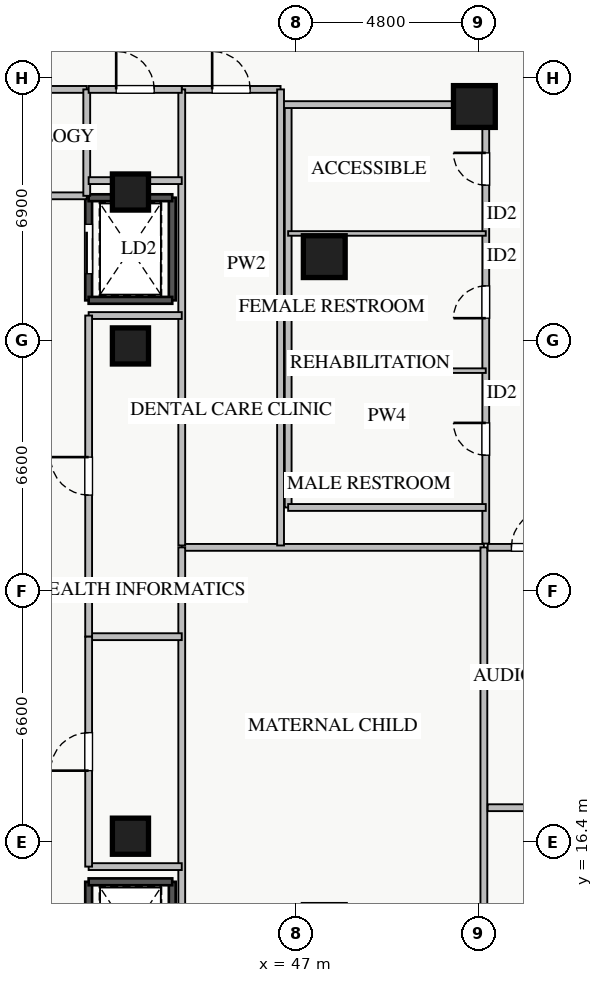
"""IFC4 building model, lengths in metres.
Left out: names, types, materials, properties, quantities, classifications, styles, units other than length and angle.
Written with IfcOpenShell. Run it as: python <this file> out.ifc"""

import sys

from ifc_helpers import new_model, si_unit, direction, frame, frame_2d, origin, origin_2d, place, context, subcontext, project, spatial, rectangle, extrude, source, transform, mapped, element, fill, save


model = new_model("IFC4")
c1 = context("Model", 3, precision=1e-05, world=origin(), true_north=direction((0.0, 1.0)))
c2 = subcontext(c1, "Body", "Model", "MODEL_VIEW")
j1 = project(units=[si_unit("LENGTHUNIT", "METRE"), si_unit("PLANEANGLEUNIT", "RADIAN")], contexts=[c1])
p1 = place(None, origin())
s1 = spatial("IfcSite", under=j1, at=p1, CompositionType="ELEMENT")
p2 = place(p1, origin())
s2 = spatial("IfcBuilding", under=s1, at=p2, CompositionType="ELEMENT")
p3 = place(p2, frame((0.0, 0.0, 18.2)))
s3 = spatial("IfcBuildingStorey", under=s2, at=p3, CompositionType="ELEMENT", Elevation=18.2)
p4 = place(p3, frame((41.55, 30.65, 0.0), z_axis=(0.0, 0.0, 1.0), x_axis=(0.0, 1.0, 0.0)))
e1 = element("IfcWall", 1, at=p4, inside=s3, PredefinedType="SHEAR", context=c2, shape_type="SweptSolid", body=[
    extrude(rectangle(XDim=2.7, YDim=0.18, at=frame_2d((1.35, 0.0))), origin(), (0.0, 0.0, 1.0), 4.62),
])
p5 = place(p4, frame((0.7, 0.0, 0.0)))
e2 = element("IfcOpeningElement", 2, at=p5, cuts=e1, PredefinedType="OPENING", context=c2, shape_type="SweptSolid", body=[
    extrude(rectangle(XDim=1.3, YDim=2.05, at=frame_2d((0.65, 1.025))), frame((0.0, 0.1, 0.0), z_axis=(0.0, -1.0, 0.0), x_axis=(1.0, 0.0, 0.0)), (0.0, 0.0, 1.0), 0.2),
])
p6 = place(p3, frame((43.75, 30.65, 0.0), z_axis=(0.0, 0.0, 1.0), x_axis=(0.0, 1.0, 0.0)))
e3 = element("IfcWall", 3, at=p6, inside=s3, PredefinedType="SHEAR", context=c2, shape_type="SweptSolid", body=[
    extrude(rectangle(XDim=2.7, YDim=0.18, at=frame_2d((1.35, 0.0))), origin(), (0.0, 0.0, 1.0), 4.62),
])
for number, where, z_axis, x_axis in (
    (4, (41.55, 30.65, 0.0), (0.0, 0.0, 1.0), (1.0, 0.0, 0.0)),
    (5, (41.55, 33.35, 0.0), (0.0, 0.0, 1.0), (1.0, 0.0, 0.0)),
):
    element("IfcWall", number, at=place(p3, frame(where, z_axis=z_axis, x_axis=x_axis)), inside=s3, PredefinedType="SHEAR", context=c2, shape_type="SweptSolid", body=[
        extrude(rectangle(XDim=2.2, YDim=0.18, at=frame_2d((1.1, 0.0))), origin(), (0.0, 0.0, 1.0), 4.62),
    ])
p7 = place(p3, frame((41.55, 12.65, 0.0), z_axis=(0.0, 0.0, 1.0), x_axis=(0.0, 1.0, 0.0)))
e6 = element("IfcWall", 6, at=p7, inside=s3, PredefinedType="SHEAR", context=c2, shape_type="SweptSolid", body=[
    extrude(rectangle(XDim=2.7, YDim=0.18, at=frame_2d((1.35, 0.0))), origin(), (0.0, 0.0, 1.0), 4.62),
])
p8 = place(p7, frame((0.7, 0.0, 0.0)))
e7 = element("IfcOpeningElement", 7, at=p8, cuts=e6, PredefinedType="OPENING", context=c2, shape_type="SweptSolid", body=[
    extrude(rectangle(XDim=1.3, YDim=2.05, at=frame_2d((0.65, 1.025))), frame((0.0, 0.1, 0.0), z_axis=(0.0, -1.0, 0.0), x_axis=(1.0, 0.0, 0.0)), (0.0, 0.0, 1.0), 0.2),
])
p9 = place(p3, frame((43.75, 12.65, 0.0), z_axis=(0.0, 0.0, 1.0), x_axis=(0.0, 1.0, 0.0)))
e8 = element("IfcWall", 8, at=p9, inside=s3, PredefinedType="SHEAR", context=c2, shape_type="SweptSolid", body=[
    extrude(rectangle(XDim=2.7, YDim=0.18, at=frame_2d((1.35, 0.0))), origin(), (0.0, 0.0, 1.0), 4.62),
])
p10 = place(p3, frame((41.55, 15.35, 0.0), z_axis=(0.0, 0.0, 1.0), x_axis=(1.0, 0.0, 0.0)))
e9 = element("IfcWall", 9, at=p10, inside=s3, PredefinedType="SHEAR", context=c2, shape_type="SweptSolid", body=[
    extrude(rectangle(XDim=2.2, YDim=0.18, at=frame_2d((1.1, 0.0))), origin(), (0.0, 0.0, 1.0), 4.62),
])
m1 = source(origin(), c2, "Body", "SweptSolid", [
    extrude(rectangle(XDim=1.1, YDim=1.1, at=origin_2d()), origin(), (0.0, 0.0, 1.0), 4.8),
])
for number, where, z_axis, x_axis in (
    (10, (51.7, 35.75, 0.0), (0.0, 0.0, 1.0), (1.0, 0.0, 0.0)),
    (11, (47.75, 31.8, 0.0), (0.0, 0.0, 1.0), (1.0, 0.0, 0.0)),
):
    element("IfcColumn", number, at=place(p3, frame(where, z_axis=z_axis, x_axis=x_axis)), inside=s3, PredefinedType="COLUMN", context=c2, shape_type="MappedRepresentation", body=[
        mapped(m1, transform((0.0, 0.0, 0.0), x_axis=(1.0, 0.0, 0.0), y_axis=(0.0, 1.0, 0.0), z_axis=(0.0, 0.0, 1.0), scale=1.0)),
    ])
m2 = source(origin(), c2, "Body", "SweptSolid", [
    extrude(rectangle(XDim=0.95, YDim=0.95, at=origin_2d()), origin(), (0.0, 0.0, 1.0), 4.8),
])
for number, where, z_axis, x_axis in (
    (12, (42.65, 16.55, 0.0), (0.0, 0.0, 1.0), (1.0, 0.0, 0.0)),
    (13, (42.65, 29.45, 0.0), (0.0, 0.0, 1.0), (1.0, 0.0, 0.0)),
    (14, (42.65, 33.5, 0.0), (0.0, 0.0, 1.0), (1.0, 0.0, 0.0)),
):
    element("IfcColumn", number, at=place(p3, frame(where, z_axis=z_axis, x_axis=x_axis)), inside=s3, PredefinedType="COLUMN", context=c2, shape_type="MappedRepresentation", body=[
        mapped(m2, transform((0.0, 0.0, 0.0), x_axis=(1.0, 0.0, 0.0), y_axis=(0.0, 1.0, 0.0), z_axis=(0.0, 0.0, 1.0), scale=1.0)),
    ])
p11 = place(p3, frame((52.0, 24.25, 0.0), z_axis=(0.0, 0.0, 1.0), x_axis=(0.0, 1.0, 0.0)))
e15 = element("IfcWall", 15, at=p11, inside=s3, PredefinedType="PARTITIONING", context=c2, shape_type="SweptSolid", body=[
    extrude(rectangle(XDim=11.55, YDim=0.18, at=frame_2d((5.775, 0.0))), origin(), (0.0, 0.0, 1.0), 4.62),
])
p12 = place(p11, frame((2.325, 0.0, 0.0)))
e16 = element("IfcOpeningElement", 16, at=p12, cuts=e15, PredefinedType="OPENING", context=c2, shape_type="SweptSolid", body=[
    extrude(rectangle(XDim=0.85, YDim=2.05, at=frame_2d((0.425, 1.025))), frame((0.0, 0.1, 0.0), z_axis=(0.0, -1.0, 0.0), x_axis=(1.0, 0.0, 0.0)), (0.0, 0.0, 1.0), 0.2),
])
p13 = place(p11, frame((5.93, 0.0, 0.0)))
e17 = element("IfcOpeningElement", 17, at=p13, cuts=e15, PredefinedType="OPENING", context=c2, shape_type="SweptSolid", body=[
    extrude(rectangle(XDim=0.85, YDim=2.05, at=frame_2d((0.425, 1.025))), frame((0.0, 0.1, 0.0), z_axis=(0.0, -1.0, 0.0), x_axis=(1.0, 0.0, 0.0)), (0.0, 0.0, 1.0), 0.2),
])
p14 = place(p11, frame((9.43, 0.0, 0.0)))
e18 = element("IfcOpeningElement", 18, at=p14, cuts=e15, PredefinedType="OPENING", context=c2, shape_type="SweptSolid", body=[
    extrude(rectangle(XDim=0.85, YDim=2.05, at=frame_2d((0.425, 1.025))), frame((0.0, 0.1, 0.0), z_axis=(0.0, -1.0, 0.0), x_axis=(1.0, 0.0, 0.0)), (0.0, 0.0, 1.0), 0.2),
])
p15 = place(p3, frame((46.8, 25.2, 0.0), z_axis=(0.0, 0.0, 1.0), x_axis=(0.0, 1.0, 0.0)))
e19 = element("IfcWall", 19, at=p15, inside=s3, PredefinedType="PARTITIONING", context=c2, shape_type="SweptSolid", body=[
    extrude(rectangle(XDim=10.6, YDim=0.18, at=frame_2d((5.3, 0.0))), origin(), (0.0, 0.0, 1.0), 4.62),
])
p16 = place(p3, frame((46.8, 25.2, 0.0), z_axis=(0.0, 0.0, 1.0), x_axis=(1.0, 0.0, 0.0)))
e20 = element("IfcWall", 20, at=p16, inside=s3, PredefinedType="PARTITIONING", context=c2, shape_type="SweptSolid", body=[
    extrude(rectangle(XDim=5.2, YDim=0.18, at=frame_2d((2.6, 0.0))), origin(), (0.0, 0.0, 1.0), 4.62),
])
p17 = place(p3, frame((46.65, 35.8, 0.0), z_axis=(0.0, 0.0, 1.0), x_axis=(1.0, 0.0, 0.0)))
e21 = element("IfcWall", 21, at=p17, inside=s3, PredefinedType="PARTITIONING", context=c2, shape_type="SweptSolid", body=[
    extrude(rectangle(XDim=5.35, YDim=0.18, at=frame_2d((2.675, 0.0))), origin(), (0.0, 0.0, 1.0), 4.62),
])
for number, where, z_axis, x_axis in (
    (22, (46.8, 28.8, 0.0), (0.0, 0.0, 1.0), (1.0, 0.0, 0.0)),
    (23, (46.8, 32.41, 0.0), (0.0, 0.0, 1.0), (1.0, 0.0, 0.0)),
):
    element("IfcWall", number, at=place(p3, frame(where, z_axis=z_axis, x_axis=x_axis)), inside=s3, PredefinedType="PLUMBINGWALL", context=c2, shape_type="SweptSolid", body=[
        extrude(rectangle(XDim=5.2, YDim=0.12, at=frame_2d((2.6, 0.0))), origin(), (0.0, 0.0, 1.0), 4.62),
    ])
p18 = place(p3, frame((32.3, 33.4, 0.0), z_axis=(0.0, 0.0, 1.0), x_axis=(1.0, 0.0, 0.0)))
e24 = element("IfcWall", 24, at=p18, inside=s3, PredefinedType="PARTITIONING", context=c2, shape_type="SweptSolid", body=[
    extrude(rectangle(XDim=9.2, YDim=0.18, at=frame_2d((4.6, 0.0))), origin(), (0.0, 0.0, 1.0), 3.915),
])
p19 = place(p3, frame((32.3, 36.2, 0.0), z_axis=(0.0, 0.0, 1.0), x_axis=(1.0, 0.0, 0.0)))
e25 = element("IfcWall", 25, at=p19, inside=s3, PredefinedType="PARTITIONING", context=c2, shape_type="SweptSolid", body=[
    extrude(rectangle(XDim=9.2, YDim=0.18, at=frame_2d((4.6, 0.0))), origin(), (0.0, 0.0, 1.0), 4.62),
])
p20 = place(p19, frame((2.85, 0.0, 0.0)))
e26 = element("IfcOpeningElement", 26, at=p20, cuts=e25, PredefinedType="OPENING", context=c2, shape_type="SweptSolid", body=[
    extrude(rectangle(XDim=1.0, YDim=2.05, at=frame_2d((0.5, 1.025))), frame((0.0, 0.1, 0.0), z_axis=(0.0, -1.0, 0.0), x_axis=(1.0, 0.0, 0.0)), (0.0, 0.0, 1.0), 0.2),
])
p21 = place(p3, frame((41.5, 33.4, 0.0), z_axis=(0.0, 0.0, 1.0), x_axis=(0.0, 1.0, 0.0)))
e27 = element("IfcWall", 27, at=p21, inside=s3, PredefinedType="PARTITIONING", context=c2, shape_type="SweptSolid", body=[
    extrude(rectangle(XDim=2.8, YDim=0.18, at=frame_2d((1.4, 0.0))), origin(), (0.0, 0.0, 1.0), 4.62),
])
p22 = place(p3, frame((44.0, 24.15, 0.0), z_axis=(0.0, 0.0, 1.0), x_axis=(1.0, 0.0, 0.0)))
e28 = element("IfcWall", 28, at=p22, inside=s3, PredefinedType="PARTITIONING", context=c2, shape_type="SweptSolid", body=[
    extrude(rectangle(XDim=7.95, YDim=0.18, at=frame_2d((3.975, 0.0))), origin(), (0.0, 0.0, 1.0), 4.62),
])
for number, where, z_axis, x_axis in (
    (29, (44.0, 9.8, 0.0), (0.0, 0.0, 1.0), (0.0, 1.0, 0.0)),
    (30, (51.95, 9.8, 0.0), (0.0, 0.0, 1.0), (0.0, 1.0, 0.0)),
):
    element("IfcWall", number, at=place(p3, frame(where, z_axis=z_axis, x_axis=x_axis)), inside=s3, PredefinedType="PARTITIONING", context=c2, shape_type="SweptSolid", body=[
        extrude(rectangle(XDim=14.35, YDim=0.18, at=frame_2d((7.175, 0.0))), origin(), (0.0, 0.0, 1.0), 4.62),
    ])
p23 = place(p3, frame((44.0, 36.2, 0.0), z_axis=(0.0, 0.0, 1.0), x_axis=(1.0, 0.0, 0.0)))
e31 = element("IfcWall", 31, at=p23, inside=s3, PredefinedType="PARTITIONING", context=c2, shape_type="SweptSolid", body=[
    extrude(rectangle(XDim=2.6, YDim=0.18, at=frame_2d((1.3, 0.0))), origin(), (0.0, 0.0, 1.0), 4.62),
])
p24 = place(p23, frame((0.8, 0.0, 0.0)))
e32 = element("IfcOpeningElement", 32, at=p24, cuts=e31, PredefinedType="OPENING", context=c2, shape_type="SweptSolid", body=[
    extrude(rectangle(XDim=1.0, YDim=2.05, at=frame_2d((0.5, 1.025))), frame((0.0, 0.1, 0.0), z_axis=(0.0, -1.0, 0.0), x_axis=(1.0, 0.0, 0.0)), (0.0, 0.0, 1.0), 0.2),
])
for number, where, z_axis, x_axis in (
    (33, (44.0, 24.2, 0.0), (0.0, 0.0, 1.0), (0.0, 1.0, 0.0)),
    (34, (46.6, 24.2, 0.0), (0.0, 0.0, 1.0), (0.0, 1.0, 0.0)),
):
    element("IfcWall", number, at=place(p3, frame(where, z_axis=z_axis, x_axis=x_axis)), inside=s3, PredefinedType="PARTITIONING", context=c2, shape_type="SweptSolid", body=[
        extrude(rectangle(XDim=12.0, YDim=0.18, at=frame_2d((6.0, 0.0))), origin(), (0.0, 0.0, 1.0), 4.62),
    ])
for number, where, z_axis, x_axis in (
    (35, (41.55, 21.8, 0.0), (0.0, 0.0, 1.0), (1.0, 0.0, 0.0)),
    (36, (41.55, 30.25, 0.0), (0.0, 0.0, 1.0), (1.0, 0.0, 0.0)),
):
    element("IfcWall", number, at=place(p3, frame(where, z_axis=z_axis, x_axis=x_axis)), inside=s3, PredefinedType="PARTITIONING", context=c2, shape_type="SweptSolid", body=[
        extrude(rectangle(XDim=2.45, YDim=0.18, at=frame_2d((1.225, 0.0))), origin(), (0.0, 0.0, 1.0), 4.62),
    ])
p25 = place(p3, frame((41.55, 21.8, 0.0), z_axis=(0.0, 0.0, 1.0), x_axis=(0.0, 1.0, 0.0)))
e37 = element("IfcWall", 37, at=p25, inside=s3, PredefinedType="PARTITIONING", context=c2, shape_type="SweptSolid", body=[
    extrude(rectangle(XDim=8.45, YDim=0.18, at=frame_2d((4.225, 0.0))), origin(), (0.0, 0.0, 1.0), 4.62),
])
p26 = place(p25, frame((3.725, 0.0, 0.0)))
e38 = element("IfcOpeningElement", 38, at=p26, cuts=e37, PredefinedType="OPENING", context=c2, shape_type="SweptSolid", body=[
    extrude(rectangle(XDim=1.0, YDim=2.05, at=frame_2d((0.5, 1.025))), frame((0.0, 0.1, 0.0), z_axis=(0.0, -1.0, 0.0), x_axis=(1.0, 0.0, 0.0)), (0.0, 0.0, 1.0), 0.2),
])
p27 = place(p3, frame((41.55, 15.75, 0.0), z_axis=(0.0, 0.0, 1.0), x_axis=(1.0, 0.0, 0.0)))
e39 = element("IfcWall", 39, at=p27, inside=s3, PredefinedType="PARTITIONING", context=c2, shape_type="SweptSolid", body=[
    extrude(rectangle(XDim=2.45, YDim=0.18, at=frame_2d((1.225, 0.0))), origin(), (0.0, 0.0, 1.0), 4.62),
])
p28 = place(p3, frame((41.55, 15.75, 0.0), z_axis=(0.0, 0.0, 1.0), x_axis=(0.0, 1.0, 0.0)))
e40 = element("IfcWall", 40, at=p28, inside=s3, PredefinedType="PARTITIONING", context=c2, shape_type="SweptSolid", body=[
    extrude(rectangle(XDim=6.05, YDim=0.18, at=frame_2d((3.025, 0.0))), origin(), (0.0, 0.0, 1.0), 4.62),
])
p29 = place(p28, frame((2.525, 0.0, 0.0)))
e41 = element("IfcOpeningElement", 41, at=p29, cuts=e40, PredefinedType="OPENING", context=c2, shape_type="SweptSolid", body=[
    extrude(rectangle(XDim=1.0, YDim=2.05, at=frame_2d((0.5, 1.025))), frame((0.0, 0.1, 0.0), z_axis=(0.0, -1.0, 0.0), x_axis=(1.0, 0.0, 0.0)), (0.0, 0.0, 1.0), 0.2),
])
p30 = place(p3, frame((41.55, 33.8, 0.0), z_axis=(0.0, 0.0, 1.0), x_axis=(1.0, 0.0, 0.0)))
e42 = element("IfcWall", 42, at=p30, inside=s3, PredefinedType="PARTITIONING", context=c2, shape_type="SweptSolid", body=[
    extrude(rectangle(XDim=2.45, YDim=0.18, at=frame_2d((1.225, 0.0))), origin(), (0.0, 0.0, 1.0), 3.915),
])
p31 = place(p3, frame((41.55, 36.2, 0.0), z_axis=(0.0, 0.0, 1.0), x_axis=(1.0, 0.0, 0.0)))
e43 = element("IfcWall", 43, at=p31, inside=s3, PredefinedType="PARTITIONING", context=c2, shape_type="SweptSolid", body=[
    extrude(rectangle(XDim=2.45, YDim=0.18, at=frame_2d((1.225, 0.0))), origin(), (0.0, 0.0, 1.0), 4.62),
])
p32 = place(p31, frame((0.725, 0.0, 0.0)))
e44 = element("IfcOpeningElement", 44, at=p32, cuts=e43, PredefinedType="OPENING", context=c2, shape_type="SweptSolid", body=[
    extrude(rectangle(XDim=1.0, YDim=2.05, at=frame_2d((0.5, 1.025))), frame((0.0, 0.1, 0.0), z_axis=(0.0, -1.0, 0.0), x_axis=(1.0, 0.0, 0.0)), (0.0, 0.0, 1.0), 0.2),
])
p33 = place(p3, frame((52.05, 17.3, 0.0), z_axis=(0.0, 0.0, 1.0), x_axis=(1.0, 0.0, 0.0)))
e45 = element("IfcWall", 45, at=p33, inside=s3, PredefinedType="PARTITIONING", context=c2, shape_type="SweptSolid", body=[
    extrude(rectangle(XDim=2.25, YDim=0.18, at=frame_2d((1.125, 0.0))), origin(), (0.0, 0.0, 1.0), 4.62),
])
p34 = place(p3, frame((52.05, 24.15, 0.0), z_axis=(0.0, 0.0, 1.0), x_axis=(1.0, 0.0, 0.0)))
e46 = element("IfcWall", 46, at=p34, inside=s3, PredefinedType="PARTITIONING", context=c2, shape_type="SweptSolid", body=[
    extrude(rectangle(XDim=2.25, YDim=0.18, at=frame_2d((1.125, 0.0))), origin(), (0.0, 0.0, 1.0), 4.62),
])
p35 = place(p34, frame((0.625, 0.0, 0.0)))
e47 = element("IfcOpeningElement", 47, at=p35, cuts=e46, PredefinedType="OPENING", context=c2, shape_type="SweptSolid", body=[
    extrude(rectangle(XDim=1.0, YDim=2.05, at=frame_2d((0.5, 1.025))), frame((0.0, 0.1, 0.0), z_axis=(0.0, -1.0, 0.0), x_axis=(1.0, 0.0, 0.0)), (0.0, 0.0, 1.0), 0.2),
])
m3 = source(origin(), c2, "Body", "SweptSolid", [
    extrude(rectangle(XDim=1.3, YDim=2.05, at=frame_2d((0.65, 1.025))), frame((0.0, 0.025, 0.0), z_axis=(0.0, -1.0, 0.0), x_axis=(1.0, 0.0, 0.0)), (0.0, 0.0, 1.0), 0.05),
])
p36 = place(p5, origin())
e48 = element("IfcDoor", 48, at=p36, inside=s3, OperationType="SLIDING_TO_LEFT", PredefinedType="DOOR", context=c2, shape_type="MappedRepresentation", body=[
    mapped(m3, transform((0.0, 0.0, 0.0), x_axis=(1.0, 0.0, 0.0), y_axis=(0.0, 1.0, 0.0), z_axis=(0.0, 0.0, 1.0), scale=1.0)),
])
fill(e2, e48)
m4 = source(origin(), c2, "Body", "SweptSolid", [
    extrude(rectangle(XDim=0.85, YDim=2.05, at=frame_2d((0.425, 1.025))), frame((0.0, 0.025, 0.0), z_axis=(0.0, -1.0, 0.0), x_axis=(1.0, 0.0, 0.0)), (0.0, 0.0, 1.0), 0.05),
])
p37 = place(p12, origin())
e49 = element("IfcDoor", 49, at=p37, inside=s3, OperationType="SINGLE_SWING_RIGHT", PredefinedType="DOOR", context=c2, shape_type="MappedRepresentation", body=[
    mapped(m4, transform((0.0, 0.0, 0.0), x_axis=(1.0, 0.0, 0.0), y_axis=(0.0, 1.0, 0.0), z_axis=(0.0, 0.0, 1.0), scale=1.0)),
])
fill(e16, e49)
p38 = place(p13, origin())
e50 = element("IfcDoor", 50, at=p38, inside=s3, OperationType="SINGLE_SWING_LEFT", PredefinedType="DOOR", context=c2, shape_type="MappedRepresentation", body=[
    mapped(m4, transform((0.0, 0.0, 0.0), x_axis=(1.0, 0.0, 0.0), y_axis=(0.0, 1.0, 0.0), z_axis=(0.0, 0.0, 1.0), scale=1.0)),
])
fill(e17, e50)
p39 = place(p14, origin())
e51 = element("IfcDoor", 51, at=p39, inside=s3, OperationType="SINGLE_SWING_RIGHT", PredefinedType="DOOR", context=c2, shape_type="MappedRepresentation", body=[
    mapped(m4, transform((0.0, 0.0, 0.0), x_axis=(1.0, 0.0, 0.0), y_axis=(0.0, 1.0, 0.0), z_axis=(0.0, 0.0, 1.0), scale=1.0)),
])
fill(e18, e51)
m5 = source(origin(), c2, "Body", "SweptSolid", [
    extrude(rectangle(XDim=1.0, YDim=2.05, at=frame_2d((0.5, 1.025))), frame((0.0, 0.025, 0.0), z_axis=(0.0, -1.0, 0.0), x_axis=(1.0, 0.0, 0.0)), (0.0, 0.0, 1.0), 0.05),
])
p40 = place(p24, origin())
e52 = element("IfcDoor", 52, at=p40, inside=s3, OperationType="SINGLE_SWING_LEFT", PredefinedType="DOOR", context=c2, shape_type="MappedRepresentation", body=[
    mapped(m5, transform((0.0, 0.0, 0.0), x_axis=(1.0, 0.0, 0.0), y_axis=(0.0, 1.0, 0.0), z_axis=(0.0, 0.0, 1.0), scale=1.0)),
])
fill(e32, e52)
p41 = place(p26, origin())
e53 = element("IfcDoor", 53, at=p41, inside=s3, OperationType="SINGLE_SWING_RIGHT", PredefinedType="DOOR", context=c2, shape_type="MappedRepresentation", body=[
    mapped(m5, transform((0.0, 0.0, 0.0), x_axis=(1.0, 0.0, 0.0), y_axis=(0.0, 1.0, 0.0), z_axis=(0.0, 0.0, 1.0), scale=1.0)),
])
fill(e38, e53)
p42 = place(p29, origin())
e54 = element("IfcDoor", 54, at=p42, inside=s3, OperationType="SINGLE_SWING_LEFT", PredefinedType="DOOR", context=c2, shape_type="MappedRepresentation", body=[
    mapped(m5, transform((0.0, 0.0, 0.0), x_axis=(1.0, 0.0, 0.0), y_axis=(0.0, 1.0, 0.0), z_axis=(0.0, 0.0, 1.0), scale=1.0)),
])
fill(e41, e54)
p43 = place(p32, origin())
e55 = element("IfcDoor", 55, at=p43, inside=s3, OperationType="SINGLE_SWING_LEFT", PredefinedType="DOOR", context=c2, shape_type="MappedRepresentation", body=[
    mapped(m5, transform((0.0, 0.0, 0.0), x_axis=(1.0, 0.0, 0.0), y_axis=(0.0, 1.0, 0.0), z_axis=(0.0, 0.0, 1.0), scale=1.0)),
])
fill(e44, e55)
p44 = place(p35, origin())
e56 = element("IfcDoor", 56, at=p44, inside=s3, OperationType="SINGLE_SWING_RIGHT", PredefinedType="DOOR", context=c2, shape_type="MappedRepresentation", body=[
    mapped(m5, transform((0.0, 0.0, 0.0), x_axis=(1.0, 0.0, 0.0), y_axis=(0.0, 1.0, 0.0), z_axis=(0.0, 0.0, 1.0), scale=1.0)),
])
fill(e47, e56)
save(model, sys.argv[1])
